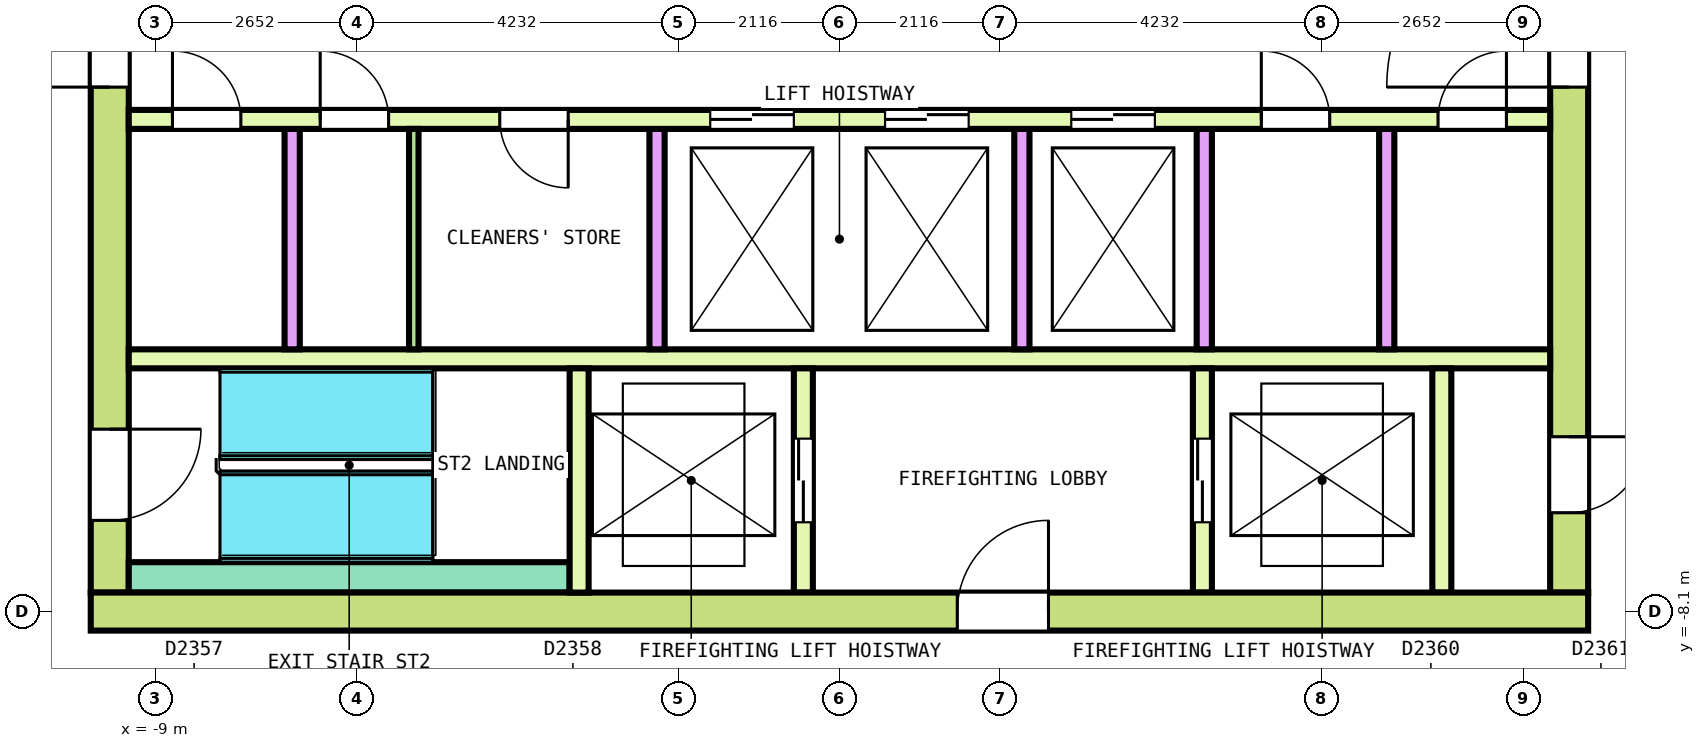
"""IFC4 building model, lengths in metres.
Left out: names, types, materials, properties, quantities, classifications, styles, units other than length and angle.
Written with IfcOpenShell. Run it as: python <this file> out.ifc"""

import sys

from ifc_helpers import new_model, si_unit, direction, frame, frame_2d, origin, place, context, subcontext, project, spatial, rectangle, extrude, element, fill, save


model = new_model("IFC4")
c1 = context("Model", 3, precision=1e-05, world=origin(), true_north=direction((0.0, 1.0)))
c2 = subcontext(c1, "Body", "Model", "MODEL_VIEW")
j1 = project(units=[si_unit("LENGTHUNIT", "METRE"), si_unit("PLANEANGLEUNIT", "RADIAN")], contexts=[c1])
p1 = place(None, origin())
s1 = spatial("IfcSite", under=j1, at=p1, CompositionType="ELEMENT")
p2 = place(p1, origin())
s2 = spatial("IfcBuilding", under=s1, at=p2, CompositionType="ELEMENT")
p3 = place(p2, frame((0.0, 0.0, 324.6)))
s3 = spatial("IfcBuildingStorey", under=s2, at=p3, CompositionType="ELEMENT", Elevation=324.6)
p4 = place(p3, frame((-9.85, -8.1, 0.0), z_axis=(0.0, 0.0, 1.0), x_axis=(1.0, 0.0, 0.0)))
e1 = element("IfcWall", 1, at=p4, inside=s3, PredefinedType="SHEAR", context=c2, shape_type="SweptSolid", body=[
    extrude(rectangle(XDim=19.7, YDim=0.5, at=frame_2d((9.85, 0.0))), origin(), (0.0, 0.0, 1.0), 3.7),
])
p5 = place(p4, frame((11.4, 0.0, 0.0)))
e2 = element("IfcOpeningElement", 2, at=p5, cuts=e1, PredefinedType="OPENING", context=c2, shape_type="SweptSolid", body=[
    extrude(rectangle(XDim=1.2, YDim=2.1, at=frame_2d((0.6, 1.05))), frame((0.0, 0.26, 0.0), z_axis=(0.0, -1.0, 0.0), x_axis=(1.0, 0.0, 0.0)), (0.0, 0.0, 1.0), 0.52),
])
p6 = place(p3, frame((-9.6, -7.85, 0.0), z_axis=(0.0, 0.0, 1.0), x_axis=(0.0, 1.0, 0.0)))
e3 = element("IfcWall", 3, at=p6, inside=s3, PredefinedType="SHEAR", context=c2, shape_type="SweptSolid", body=[
    extrude(rectangle(XDim=15.7, YDim=0.5, at=frame_2d((7.85, 0.0))), origin(), (0.0, 0.0, 1.0), 3.7),
])
p7 = place(p6, frame((6.65, 0.0, 0.0)))
e4 = element("IfcOpeningElement", 4, at=p7, cuts=e3, PredefinedType="OPENING", context=c2, shape_type="SweptSolid", body=[
    extrude(rectangle(XDim=2.4, YDim=2.1, at=frame_2d((1.2, 1.05))), frame((0.0, 0.26, 0.0), z_axis=(0.0, -1.0, 0.0), x_axis=(1.0, 0.0, 0.0)), (0.0, 0.0, 1.0), 0.52),
])
p8 = place(p6, frame((13.55, 0.0, 0.0)))
e5 = element("IfcOpeningElement", 5, at=p8, cuts=e3, PredefinedType="OPENING", context=c2, shape_type="SweptSolid", body=[
    extrude(rectangle(XDim=1.2, YDim=2.1, at=frame_2d((0.6, 1.05))), frame((0.0, 0.26, 0.0), z_axis=(0.0, -1.0, 0.0), x_axis=(1.0, 0.0, 0.0)), (0.0, 0.0, 1.0), 0.52),
])
p9 = place(p6, frame((0.95, 0.0, 0.0)))
e6 = element("IfcOpeningElement", 6, at=p9, cuts=e3, PredefinedType="OPENING", context=c2, shape_type="SweptSolid", body=[
    extrude(rectangle(XDim=1.2, YDim=2.1, at=frame_2d((0.6, 1.05))), frame((0.0, 0.26, 0.0), z_axis=(0.0, -1.0, 0.0), x_axis=(1.0, 0.0, 0.0)), (0.0, 0.0, 1.0), 0.52),
])
p10 = place(p3, frame((9.6, -7.85, 0.0), z_axis=(0.0, 0.0, 1.0), x_axis=(0.0, 1.0, 0.0)))
e7 = element("IfcWall", 7, at=p10, inside=s3, PredefinedType="SHEAR", context=c2, shape_type="SweptSolid", body=[
    extrude(rectangle(XDim=15.7, YDim=0.5, at=frame_2d((7.85, 0.0))), origin(), (0.0, 0.0, 1.0), 3.7),
])
p11 = place(p10, frame((6.65, 0.0, 0.0)))
e8 = element("IfcOpeningElement", 8, at=p11, cuts=e7, PredefinedType="OPENING", context=c2, shape_type="SweptSolid", body=[
    extrude(rectangle(XDim=2.4, YDim=2.1, at=frame_2d((1.2, 1.05))), frame((0.0, 0.26, 0.0), z_axis=(0.0, -1.0, 0.0), x_axis=(1.0, 0.0, 0.0)), (0.0, 0.0, 1.0), 0.52),
])
p12 = place(p10, frame((13.55, 0.0, 0.0)))
e9 = element("IfcOpeningElement", 9, at=p12, cuts=e7, PredefinedType="OPENING", context=c2, shape_type="SweptSolid", body=[
    extrude(rectangle(XDim=1.2, YDim=2.1, at=frame_2d((0.6, 1.05))), frame((0.0, 0.26, 0.0), z_axis=(0.0, -1.0, 0.0), x_axis=(1.0, 0.0, 0.0)), (0.0, 0.0, 1.0), 0.52),
])
p13 = place(p10, frame((1.05, 0.0, 0.0)))
e10 = element("IfcOpeningElement", 10, at=p13, cuts=e7, PredefinedType="OPENING", context=c2, shape_type="SweptSolid", body=[
    extrude(rectangle(XDim=1.0, YDim=2.1, at=frame_2d((0.5, 1.05))), frame((0.0, 0.26, 0.0), z_axis=(0.0, -1.0, 0.0), x_axis=(1.0, 0.0, 0.0)), (0.0, 0.0, 1.0), 0.52),
])
p14 = place(p3, frame((-9.35, -1.625, 0.0), z_axis=(0.0, 0.0, 1.0), x_axis=(1.0, 0.0, 0.0)))
e11 = element("IfcWall", 11, at=p14, inside=s3, PredefinedType="SOLIDWALL", context=c2, shape_type="SweptSolid", body=[
    extrude(rectangle(XDim=18.7, YDim=0.25, at=frame_2d((9.35, 0.0))), origin(), (0.0, 0.0, 1.0), 3.7),
])
p15 = place(p14, frame((7.65, 0.0, 0.0)))
e12 = element("IfcOpeningElement", 12, at=p15, cuts=e11, PredefinedType="OPENING", context=c2, shape_type="SweptSolid", body=[
    extrude(rectangle(XDim=1.1, YDim=2.1, at=frame_2d((0.55, 1.05))), frame((0.0, 0.135, 0.0), z_axis=(0.0, -1.0, 0.0), x_axis=(1.0, 0.0, 0.0)), (0.0, 0.0, 1.0), 0.27),
])
p16 = place(p14, frame((9.95, 0.0, 0.0)))
e13 = element("IfcOpeningElement", 13, at=p16, cuts=e11, PredefinedType="OPENING", context=c2, shape_type="SweptSolid", body=[
    extrude(rectangle(XDim=1.1, YDim=2.1, at=frame_2d((0.55, 1.05))), frame((0.0, 0.135, 0.0), z_axis=(0.0, -1.0, 0.0), x_axis=(1.0, 0.0, 0.0)), (0.0, 0.0, 1.0), 0.27),
])
p17 = place(p14, frame((12.4, 0.0, 0.0)))
e14 = element("IfcOpeningElement", 14, at=p17, cuts=e11, PredefinedType="OPENING", context=c2, shape_type="SweptSolid", body=[
    extrude(rectangle(XDim=1.1, YDim=2.1, at=frame_2d((0.55, 1.05))), frame((0.0, 0.135, 0.0), z_axis=(0.0, -1.0, 0.0), x_axis=(1.0, 0.0, 0.0)), (0.0, 0.0, 1.0), 0.27),
])
p18 = place(p14, frame((0.575, 0.0, 0.0)))
e15 = element("IfcOpeningElement", 15, at=p18, cuts=e11, PredefinedType="OPENING", context=c2, shape_type="SweptSolid", body=[
    extrude(rectangle(XDim=0.9, YDim=2.1, at=frame_2d((0.45, 1.05))), frame((0.0, 0.135, 0.0), z_axis=(0.0, -1.0, 0.0), x_axis=(1.0, 0.0, 0.0)), (0.0, 0.0, 1.0), 0.27),
])
p19 = place(p14, frame((2.519, 0.0, 0.0)))
e16 = element("IfcOpeningElement", 16, at=p19, cuts=e11, PredefinedType="OPENING", context=c2, shape_type="SweptSolid", body=[
    extrude(rectangle(XDim=0.9, YDim=2.1, at=frame_2d((0.45, 1.05))), frame((0.0, 0.135, 0.0), z_axis=(0.0, -1.0, 0.0), x_axis=(1.0, 0.0, 0.0)), (0.0, 0.0, 1.0), 0.27),
])
p20 = place(p14, frame((4.881, 0.0, 0.0)))
e17 = element("IfcOpeningElement", 17, at=p20, cuts=e11, PredefinedType="OPENING", context=c2, shape_type="SweptSolid", body=[
    extrude(rectangle(XDim=0.9, YDim=2.1, at=frame_2d((0.45, 1.05))), frame((0.0, 0.135, 0.0), z_axis=(0.0, -1.0, 0.0), x_axis=(1.0, 0.0, 0.0)), (0.0, 0.0, 1.0), 0.27),
])
p21 = place(p14, frame((14.9, 0.0, 0.0)))
e18 = element("IfcOpeningElement", 18, at=p21, cuts=e11, PredefinedType="OPENING", context=c2, shape_type="SweptSolid", body=[
    extrude(rectangle(XDim=0.9, YDim=2.1, at=frame_2d((0.45, 1.05))), frame((0.0, 0.135, 0.0), z_axis=(0.0, -1.0, 0.0), x_axis=(1.0, 0.0, 0.0)), (0.0, 0.0, 1.0), 0.27),
])
p22 = place(p14, frame((17.225, 0.0, 0.0)))
e19 = element("IfcOpeningElement", 19, at=p22, cuts=e11, PredefinedType="OPENING", context=c2, shape_type="SweptSolid", body=[
    extrude(rectangle(XDim=0.9, YDim=2.1, at=frame_2d((0.45, 1.05))), frame((0.0, 0.135, 0.0), z_axis=(0.0, -1.0, 0.0), x_axis=(1.0, 0.0, 0.0)), (0.0, 0.0, 1.0), 0.27),
])
p23 = place(p3, frame((-9.35, -4.775, 0.0), z_axis=(0.0, 0.0, 1.0), x_axis=(1.0, 0.0, 0.0)))
e20 = element("IfcWall", 20, at=p23, inside=s3, PredefinedType="SOLIDWALL", context=c2, shape_type="SweptSolid", body=[
    extrude(rectangle(XDim=18.7, YDim=0.25, at=frame_2d((9.35, 0.0))), origin(), (0.0, 0.0, 1.0), 3.7),
])
for number, where, z_axis, x_axis in (
    (21, (-7.2, -4.65, 0.0), (0.0, 0.0, 1.0), (0.0, 1.0, 0.0)),
    (22, (-2.4, -4.65, 0.0), (0.0, 0.0, 1.0), (0.0, 1.0, 0.0)),
    (23, (2.4, -4.65, 0.0), (0.0, 0.0, 1.0), (0.0, 1.0, 0.0)),
    (24, (4.8, -4.65, 0.0), (0.0, 0.0, 1.0), (0.0, 1.0, 0.0)),
    (25, (7.2, -4.65, 0.0), (0.0, 0.0, 1.0), (0.0, 1.0, 0.0)),
):
    element("IfcWall", number, at=place(p3, frame(where, z_axis=z_axis, x_axis=x_axis)), inside=s3, PredefinedType="SOLIDWALL", context=c2, shape_type="SweptSolid", body=[
        extrude(rectangle(XDim=2.9, YDim=0.2, at=frame_2d((1.45, 0.0))), origin(), (0.0, 0.0, 1.0), 3.7),
    ])
p24 = place(p3, frame((-9.35, -7.65, 0.0), z_axis=(0.0, 0.0, 1.0), x_axis=(1.0, 0.0, 0.0)))
e26 = element("IfcWall", 26, at=p24, inside=s3, PredefinedType="SOLIDWALL", context=c2, shape_type="SweptSolid", body=[
    extrude(rectangle(XDim=5.8, YDim=0.4, at=frame_2d((2.9, 0.0))), origin(), (0.0, 0.0, 1.0), 3.7),
])
p25 = place(p3, frame((-3.425, -7.85, 0.0), z_axis=(0.0, 0.0, 1.0), x_axis=(0.0, 1.0, 0.0)))
e27 = element("IfcWall", 27, at=p25, inside=s3, PredefinedType="SOLIDWALL", context=c2, shape_type="SweptSolid", body=[
    extrude(rectangle(XDim=2.95, YDim=0.25, at=frame_2d((1.475, 0.0))), origin(), (0.0, 0.0, 1.0), 3.7),
])
p26 = place(p3, frame((-0.475, -7.85, 0.0), z_axis=(0.0, 0.0, 1.0), x_axis=(0.0, 1.0, 0.0)))
e28 = element("IfcWall", 28, at=p26, inside=s3, PredefinedType="SOLIDWALL", context=c2, shape_type="SweptSolid", body=[
    extrude(rectangle(XDim=2.95, YDim=0.25, at=frame_2d((1.475, 0.0))), origin(), (0.0, 0.0, 1.0), 3.7),
])
p27 = place(p26, frame((0.925, 0.0, 0.0)))
e29 = element("IfcOpeningElement", 29, at=p27, cuts=e28, PredefinedType="OPENING", context=c2, shape_type="SweptSolid", body=[
    extrude(rectangle(XDim=1.1, YDim=2.1, at=frame_2d((0.55, 1.05))), frame((0.0, 0.135, 0.0), z_axis=(0.0, -1.0, 0.0), x_axis=(1.0, 0.0, 0.0)), (0.0, 0.0, 1.0), 0.27),
])
p28 = place(p3, frame((4.775, -7.85, 0.0), z_axis=(0.0, 0.0, 1.0), x_axis=(0.0, 1.0, 0.0)))
e30 = element("IfcWall", 30, at=p28, inside=s3, PredefinedType="SOLIDWALL", context=c2, shape_type="SweptSolid", body=[
    extrude(rectangle(XDim=2.95, YDim=0.25, at=frame_2d((1.475, 0.0))), origin(), (0.0, 0.0, 1.0), 3.7),
])
p29 = place(p28, frame((0.925, 0.0, 0.0)))
e31 = element("IfcOpeningElement", 31, at=p29, cuts=e30, PredefinedType="OPENING", context=c2, shape_type="SweptSolid", body=[
    extrude(rectangle(XDim=1.1, YDim=2.1, at=frame_2d((0.55, 1.05))), frame((0.0, 0.135, 0.0), z_axis=(0.0, -1.0, 0.0), x_axis=(1.0, 0.0, 0.0)), (0.0, 0.0, 1.0), 0.27),
])
p30 = place(p3, frame((7.925, -7.85, 0.0), z_axis=(0.0, 0.0, 1.0), x_axis=(0.0, 1.0, 0.0)))
e32 = element("IfcWall", 32, at=p30, inside=s3, PredefinedType="SOLIDWALL", context=c2, shape_type="SweptSolid", body=[
    extrude(rectangle(XDim=2.95, YDim=0.25, at=frame_2d((1.475, 0.0))), origin(), (0.0, 0.0, 1.0), 3.7),
])
p31 = place(p3, frame((-5.6, -4.65, 0.0), z_axis=(0.0, 0.0, 1.0), x_axis=(0.0, 1.0, 0.0)))
e33 = element("IfcWall", 33, at=p31, inside=s3, PredefinedType="PARTITIONING", context=c2, shape_type="SweptSolid", body=[
    extrude(rectangle(XDim=2.9, YDim=0.125, at=frame_2d((1.45, 0.0))), origin(), (0.0, 0.0, 1.0), 3.7),
])
p32 = place(p15, origin())
e34 = element("IfcDoor", 34, at=p32, inside=s3, OperationType="DOUBLE_DOOR_SLIDING", PredefinedType="DOOR", context=c2, shape_type="SweptSolid", body=[
    extrude(rectangle(XDim=1.1, YDim=2.1, at=frame_2d((0.55, 1.05))), frame((0.0, 0.075, 0.0), z_axis=(0.0, -1.0, 0.0), x_axis=(1.0, 0.0, 0.0)), (0.0, 0.0, 1.0), 0.15),
])
fill(e12, e34)
p33 = place(p16, origin())
e35 = element("IfcDoor", 35, at=p33, inside=s3, OperationType="DOUBLE_DOOR_SLIDING", PredefinedType="DOOR", context=c2, shape_type="SweptSolid", body=[
    extrude(rectangle(XDim=1.1, YDim=2.1, at=frame_2d((0.55, 1.05))), frame((0.0, 0.075, 0.0), z_axis=(0.0, -1.0, 0.0), x_axis=(1.0, 0.0, 0.0)), (0.0, 0.0, 1.0), 0.15),
])
fill(e13, e35)
p34 = place(p17, origin())
e36 = element("IfcDoor", 36, at=p34, inside=s3, OperationType="DOUBLE_DOOR_SLIDING", PredefinedType="DOOR", context=c2, shape_type="SweptSolid", body=[
    extrude(rectangle(XDim=1.1, YDim=2.1, at=frame_2d((0.55, 1.05))), frame((0.0, 0.075, 0.0), z_axis=(0.0, -1.0, 0.0), x_axis=(1.0, 0.0, 0.0)), (0.0, 0.0, 1.0), 0.15),
])
fill(e14, e36)
p35 = place(p27, origin())
e37 = element("IfcDoor", 37, at=p35, inside=s3, OperationType="DOUBLE_DOOR_SLIDING", PredefinedType="DOOR", context=c2, shape_type="SweptSolid", body=[
    extrude(rectangle(XDim=1.1, YDim=2.1, at=frame_2d((0.55, 1.05))), frame((0.0, 0.075, 0.0), z_axis=(0.0, -1.0, 0.0), x_axis=(1.0, 0.0, 0.0)), (0.0, 0.0, 1.0), 0.15),
])
fill(e29, e37)
p36 = place(p29, origin())
e38 = element("IfcDoor", 38, at=p36, inside=s3, OperationType="DOUBLE_DOOR_SLIDING", PredefinedType="DOOR", context=c2, shape_type="SweptSolid", body=[
    extrude(rectangle(XDim=1.1, YDim=2.1, at=frame_2d((0.55, 1.05))), frame((0.0, 0.075, 0.0), z_axis=(0.0, -1.0, 0.0), x_axis=(1.0, 0.0, 0.0)), (0.0, 0.0, 1.0), 0.15),
])
fill(e31, e38)
p37 = place(p7, origin())
e39 = element("IfcDoor", 39, at=p37, inside=s3, OperationType="DOUBLE_DOOR_SINGLE_SWING", PredefinedType="DOOR", context=c2, shape_type="SweptSolid", body=[
    extrude(rectangle(XDim=2.4, YDim=2.1, at=frame_2d((1.2, 1.05))), frame((0.0, 0.2, 0.0), z_axis=(0.0, -1.0, 0.0), x_axis=(1.0, 0.0, 0.0)), (0.0, 0.0, 1.0), 0.4),
])
fill(e4, e39)
p38 = place(p11, origin())
e40 = element("IfcDoor", 40, at=p38, inside=s3, OperationType="DOUBLE_DOOR_SINGLE_SWING", PredefinedType="DOOR", context=c2, shape_type="SweptSolid", body=[
    extrude(rectangle(XDim=2.4, YDim=2.1, at=frame_2d((1.2, 1.05))), frame((0.0, 0.2, 0.0), z_axis=(0.0, -1.0, 0.0), x_axis=(1.0, 0.0, 0.0)), (0.0, 0.0, 1.0), 0.4),
])
fill(e8, e40)
p39 = place(p9, origin())
e41 = element("IfcDoor", 41, at=p39, inside=s3, OperationType="SINGLE_SWING_LEFT", PredefinedType="DOOR", context=c2, shape_type="SweptSolid", body=[
    extrude(rectangle(XDim=1.2, YDim=2.1, at=frame_2d((0.6, 1.05))), frame((0.0, 0.2, 0.0), z_axis=(0.0, -1.0, 0.0), x_axis=(1.0, 0.0, 0.0)), (0.0, 0.0, 1.0), 0.4),
])
fill(e6, e41)
p40 = place(p5, origin())
e42 = element("IfcDoor", 42, at=p40, inside=s3, OperationType="SINGLE_SWING_LEFT", PredefinedType="DOOR", context=c2, shape_type="SweptSolid", body=[
    extrude(rectangle(XDim=1.2, YDim=2.1, at=frame_2d((0.6, 1.05))), frame((0.0, 0.2, 0.0), z_axis=(0.0, -1.0, 0.0), x_axis=(1.0, 0.0, 0.0)), (0.0, 0.0, 1.0), 0.4),
])
fill(e2, e42)
p41 = place(p13, origin())
e43 = element("IfcDoor", 43, at=p41, inside=s3, OperationType="SINGLE_SWING_LEFT", PredefinedType="DOOR", context=c2, shape_type="SweptSolid", body=[
    extrude(rectangle(XDim=1.0, YDim=2.1, at=frame_2d((0.5, 1.05))), frame((0.0, 0.2, 0.0), z_axis=(0.0, -1.0, 0.0), x_axis=(1.0, 0.0, 0.0)), (0.0, 0.0, 1.0), 0.4),
])
fill(e10, e43)
p42 = place(p18, origin())
e44 = element("IfcDoor", 44, at=p42, inside=s3, OperationType="SINGLE_SWING_LEFT", PredefinedType="DOOR", context=c2, shape_type="SweptSolid", body=[
    extrude(rectangle(XDim=0.9, YDim=2.1, at=frame_2d((0.45, 1.05))), frame((0.0, 0.075, 0.0), z_axis=(0.0, -1.0, 0.0), x_axis=(1.0, 0.0, 0.0)), (0.0, 0.0, 1.0), 0.15),
])
fill(e15, e44)
p43 = place(p19, origin())
e45 = element("IfcDoor", 45, at=p43, inside=s3, OperationType="SINGLE_SWING_RIGHT", PredefinedType="DOOR", context=c2, shape_type="SweptSolid", body=[
    extrude(rectangle(XDim=0.9, YDim=2.1, at=frame_2d((0.45, 1.05))), frame((0.0, 0.075, 0.0), z_axis=(0.0, -1.0, 0.0), x_axis=(1.0, 0.0, 0.0)), (0.0, 0.0, 1.0), 0.15),
])
fill(e16, e45)
p44 = place(p20, origin())
e46 = element("IfcDoor", 46, at=p44, inside=s3, OperationType="SINGLE_SWING_LEFT", PredefinedType="DOOR", context=c2, shape_type="SweptSolid", body=[
    extrude(rectangle(XDim=0.9, YDim=2.1, at=frame_2d((0.45, 1.05))), frame((0.0, 0.075, 0.0), z_axis=(0.0, -1.0, 0.0), x_axis=(1.0, 0.0, 0.0)), (0.0, 0.0, 1.0), 0.15),
])
fill(e17, e46)
p45 = place(p21, origin())
e47 = element("IfcDoor", 47, at=p45, inside=s3, OperationType="SINGLE_SWING_RIGHT", PredefinedType="DOOR", context=c2, shape_type="SweptSolid", body=[
    extrude(rectangle(XDim=0.9, YDim=2.1, at=frame_2d((0.45, 1.05))), frame((0.0, 0.075, 0.0), z_axis=(0.0, -1.0, 0.0), x_axis=(1.0, 0.0, 0.0)), (0.0, 0.0, 1.0), 0.15),
])
fill(e18, e47)
p46 = place(p22, origin())
e48 = element("IfcDoor", 48, at=p46, inside=s3, OperationType="SINGLE_SWING_LEFT", PredefinedType="DOOR", context=c2, shape_type="SweptSolid", body=[
    extrude(rectangle(XDim=0.9, YDim=2.1, at=frame_2d((0.45, 1.05))), frame((0.0, 0.075, 0.0), z_axis=(0.0, -1.0, 0.0), x_axis=(1.0, 0.0, 0.0)), (0.0, 0.0, 1.0), 0.15),
])
fill(e19, e48)
save(model, sys.argv[1])
